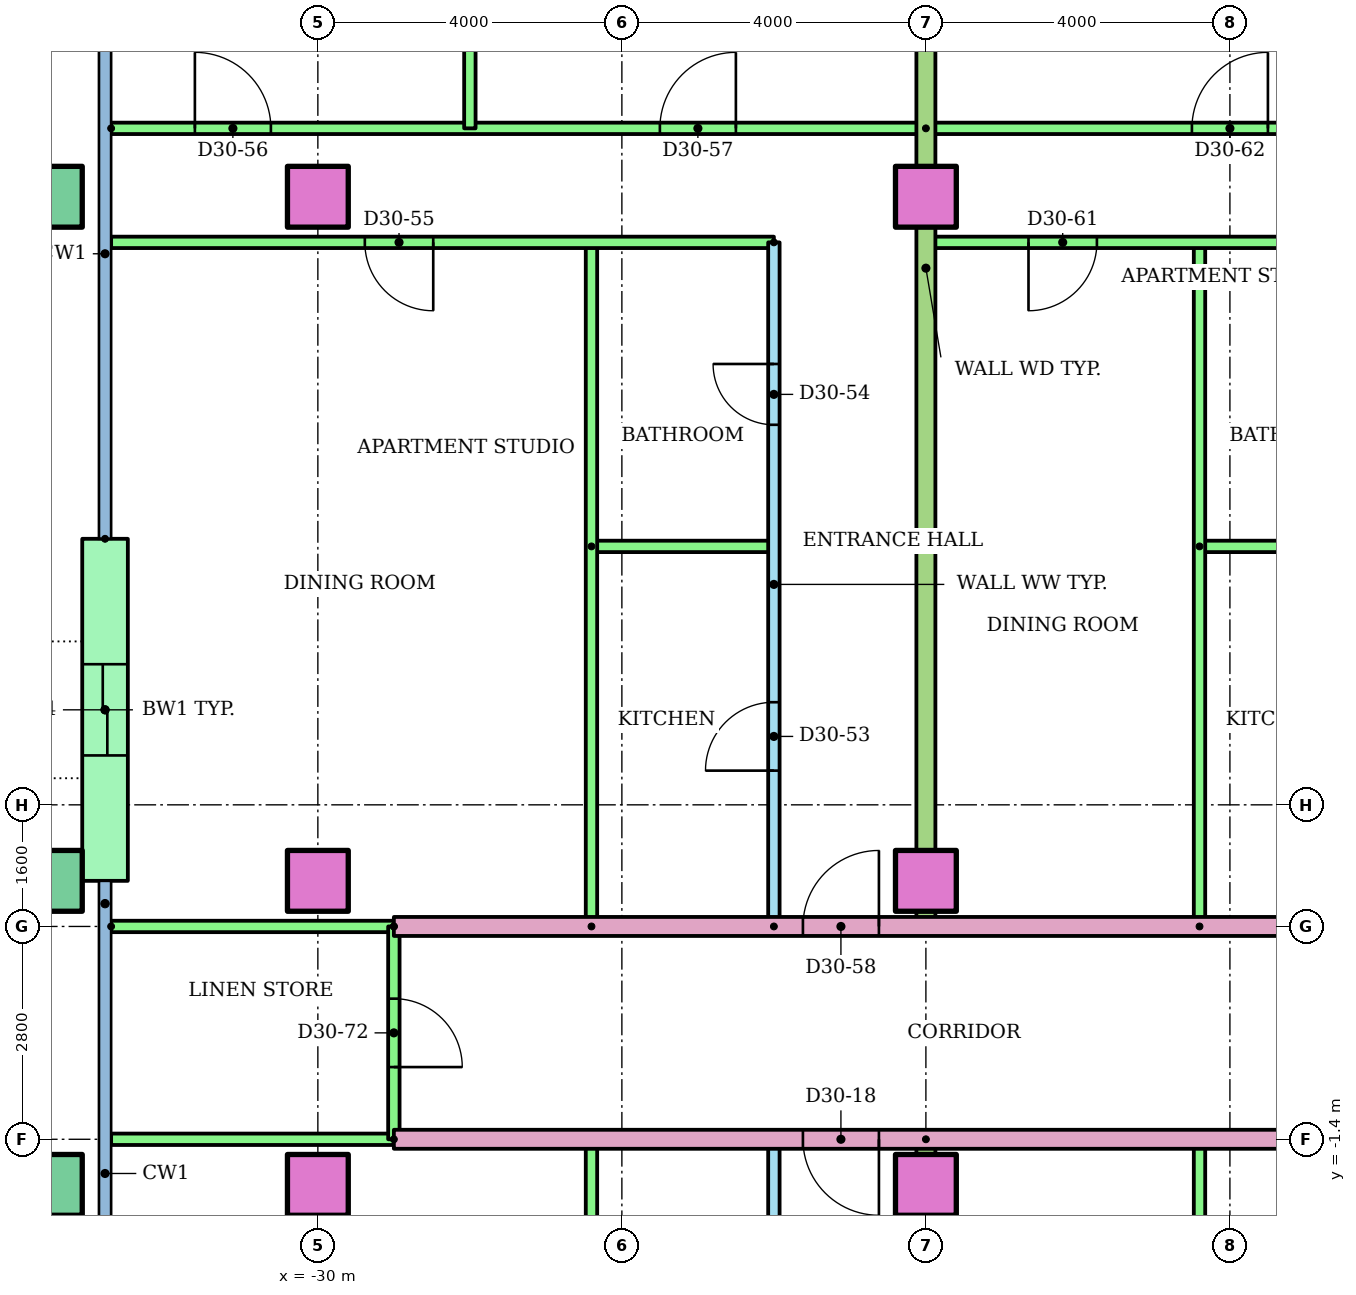
"""IFC4 building model, lengths in metres.
Left out: names, types, materials, properties, quantities, classifications, styles, units other than length and angle.
Written with IfcOpenShell. Run it as: python <this file> out.ifc"""

import sys

from ifc_helpers import new_model, si_unit, direction, frame, frame_2d, origin, origin_2d, place, context, subcontext, project, spatial, rectangle, hollow_rectangle, extrude, element, fill, save


model = new_model("IFC4")
c1 = context("Model", 3, precision=1e-05, world=origin(), true_north=direction((0.0, 1.0)))
c2 = subcontext(c1, "Body", "Model", "MODEL_VIEW")
j1 = project(units=[si_unit("LENGTHUNIT", "METRE"), si_unit("PLANEANGLEUNIT", "RADIAN")], contexts=[c1])
p1 = place(None, origin())
s1 = spatial("IfcSite", under=j1, at=p1, CompositionType="ELEMENT")
p2 = place(p1, origin())
s2 = spatial("IfcBuilding", under=s1, at=p2, CompositionType="ELEMENT")
p3 = place(p2, frame((0.0, 0.0, 119.8)))
s3 = spatial("IfcBuildingStorey", under=s2, at=p3, CompositionType="ELEMENT", Elevation=119.8)
p4 = place(p3, frame((-33.5, -2.0, 0.0)))
e1 = element("IfcColumn", 1, at=p4, inside=s3, PredefinedType="COLUMN", context=c2, shape_type="SweptSolid", body=[
    extrude(hollow_rectangle(XDim=0.8, YDim=0.8, WallThickness=0.04, at=origin_2d()), origin(), (0.0, 0.0, 1.0), 3.2),
])
for number, where in (
    (2, (-30.0, -2.0, 0.0)),
    (3, (-22.0, -2.0, 0.0)),
):
    element("IfcColumn", number, at=place(p3, frame(where)), inside=s3, PredefinedType="COLUMN", context=c2, shape_type="SweptSolid", body=[
        extrude(rectangle(XDim=0.8, YDim=0.8, at=origin_2d()), origin(), (0.0, 0.0, 1.0), 3.2),
    ])
p5 = place(p3, frame((-33.5, 2.0, 0.0)))
e4 = element("IfcColumn", 4, at=p5, inside=s3, PredefinedType="COLUMN", context=c2, shape_type="SweptSolid", body=[
    extrude(hollow_rectangle(XDim=0.8, YDim=0.8, WallThickness=0.04, at=origin_2d()), origin(), (0.0, 0.0, 1.0), 3.2),
])
for number, where in (
    (5, (-30.0, 2.0, 0.0)),
    (6, (-22.0, 2.0, 0.0)),
):
    element("IfcColumn", number, at=place(p3, frame(where)), inside=s3, PredefinedType="COLUMN", context=c2, shape_type="SweptSolid", body=[
        extrude(rectangle(XDim=0.8, YDim=0.8, at=origin_2d()), origin(), (0.0, 0.0, 1.0), 3.2),
    ])
p6 = place(p3, frame((-33.5, 11.0, 0.0)))
e7 = element("IfcColumn", 7, at=p6, inside=s3, PredefinedType="COLUMN", context=c2, shape_type="SweptSolid", body=[
    extrude(hollow_rectangle(XDim=0.8, YDim=0.8, WallThickness=0.04, at=origin_2d()), origin(), (0.0, 0.0, 1.0), 3.2),
])
for number, where in (
    (8, (-30.0, 11.0, 0.0)),
    (9, (-22.0, 11.0, 0.0)),
):
    element("IfcColumn", number, at=place(p3, frame(where)), inside=s3, PredefinedType="COLUMN", context=c2, shape_type="SweptSolid", body=[
        extrude(rectangle(XDim=0.8, YDim=0.8, at=origin_2d()), origin(), (0.0, 0.0, 1.0), 3.2),
    ])
p7 = place(p3, frame((-32.8, 6.5, 0.0), z_axis=(0.0, 0.0, 1.0), x_axis=(0.0, -1.0, 0.0)))
e10 = element("IfcWall", 10, at=p7, inside=s3, PredefinedType="STANDARD", context=c2, shape_type="SweptSolid", body=[
    extrude(rectangle(XDim=4.5, YDim=0.6, at=frame_2d((2.25, 0.0))), origin(), (0.0, 0.0, 1.0), 2.92),
])
p8 = place(p7, frame((1.65, 0.0, 0.0)))
e11 = element("IfcOpeningElement", 11, at=p8, cuts=e10, PredefinedType="OPENING", context=c2, shape_type="SweptSolid", body=[
    extrude(rectangle(XDim=1.2, YDim=2.1, at=frame_2d((0.6, 1.05))), frame((0.0, 0.31, 0.0), z_axis=(0.0, -1.0, 0.0), x_axis=(1.0, 0.0, 0.0)), (0.0, 0.0, 1.0), 0.62),
])
p9 = place(p3, frame((-24.0, -8.0, 0.0), z_axis=(0.0, 0.0, 1.0), x_axis=(0.0, 1.0, 0.0)))
e12 = element("IfcWall", 12, at=p9, inside=s3, PredefinedType="PARTITIONING", context=c2, shape_type="SweptSolid", body=[
    extrude(rectangle(XDim=6.6, YDim=0.15, at=frame_2d((3.3, 0.0))), origin(), (0.0, 0.0, 1.0), 2.4),
])
p10 = place(p9, frame((4.275, 0.0, 0.0)))
e13 = element("IfcOpeningElement", 13, at=p10, cuts=e12, PredefinedType="OPENING", context=c2, shape_type="SweptSolid", body=[
    extrude(rectangle(XDim=0.9, YDim=2.1, at=frame_2d((0.45, 1.05))), frame((0.0, 0.085, 0.0), z_axis=(0.0, -1.0, 0.0), x_axis=(1.0, 0.0, 0.0)), (0.0, 0.0, 1.0), 0.17),
])
p11 = place(p9, frame((1.025, 0.0, 0.0)))
e14 = element("IfcOpeningElement", 14, at=p11, cuts=e12, PredefinedType="OPENING", context=c2, shape_type="SweptSolid", body=[
    extrude(rectangle(XDim=0.8, YDim=2.1, at=frame_2d((0.4, 1.05))), frame((0.0, 0.085, 0.0), z_axis=(0.0, -1.0, 0.0), x_axis=(1.0, 0.0, 0.0)), (0.0, 0.0, 1.0), 0.17),
])
for number, where, z_axis, x_axis in (
    (15, (-26.4, -8.0, 0.0), (0.0, 0.0, 1.0), (0.0, 1.0, 0.0)),
    (16, (-18.4, -8.0, 0.0), (0.0, 0.0, 1.0), (0.0, 1.0, 0.0)),
):
    element("IfcWall", number, at=place(p3, frame(where, z_axis=z_axis, x_axis=x_axis)), inside=s3, PredefinedType="PARTITIONING", context=c2, shape_type="SweptSolid", body=[
        extrude(rectangle(XDim=6.6, YDim=0.15, at=frame_2d((3.3, 0.0))), origin(), (0.0, 0.0, 1.0), 2.4),
    ])
p12 = place(p3, frame((-22.0, -1.4, 0.0), z_axis=(0.0, 0.0, 1.0), x_axis=(0.0, -1.0, 0.0)))
e17 = element("IfcWall", 17, at=p12, inside=s3, PredefinedType="PARTITIONING", context=c2, shape_type="SweptSolid", body=[
    extrude(rectangle(XDim=14.91, YDim=0.25, at=frame_2d((7.455, 0.0))), origin(), (0.0, 0.0, 1.0), 2.4),
])
p13 = place(p3, frame((-14.0, -1.4, 0.0), z_axis=(0.0, 0.0, 1.0), x_axis=(-1.0, 0.0, 0.0)))
e18 = element("IfcWall", 18, at=p13, inside=s3, PredefinedType="PARTITIONING", context=c2, shape_type="SweptSolid", body=[
    extrude(rectangle(XDim=15.0, YDim=0.25, at=frame_2d((7.5, 0.0))), origin(), (0.0, 0.0, 1.0), 2.4),
])
p14 = place(p13, frame((8.618, 0.0, 0.0)))
e19 = element("IfcOpeningElement", 19, at=p14, cuts=e18, PredefinedType="OPENING", context=c2, shape_type="SweptSolid", body=[
    extrude(rectangle(XDim=1.0, YDim=2.1, at=frame_2d((0.5, 1.05))), frame((0.0, 0.135, 0.0), z_axis=(0.0, -1.0, 0.0), x_axis=(1.0, 0.0, 0.0)), (0.0, 0.0, 1.0), 0.27),
])
p15 = place(p13, frame((0.618, 0.0, 0.0)))
e20 = element("IfcOpeningElement", 20, at=p15, cuts=e18, PredefinedType="OPENING", context=c2, shape_type="SweptSolid", body=[
    extrude(rectangle(XDim=1.0, YDim=2.1, at=frame_2d((0.5, 1.05))), frame((0.0, 0.135, 0.0), z_axis=(0.0, -1.0, 0.0), x_axis=(1.0, 0.0, 0.0)), (0.0, 0.0, 1.0), 0.27),
])
p16 = place(p3, frame((-29.0, -1.4, 0.0), z_axis=(0.0, 0.0, 1.0), x_axis=(-1.0, 0.0, 0.0)))
e21 = element("IfcWall", 21, at=p16, inside=s3, PredefinedType="PARTITIONING", context=c2, shape_type="SweptSolid", body=[
    extrude(rectangle(XDim=3.72, YDim=0.15, at=frame_2d((1.86, 0.0))), origin(), (0.0, 0.0, 1.0), 2.4),
])
p17 = place(p3, frame((-24.0, 1.4, 0.0), z_axis=(0.0, 0.0, 1.0), x_axis=(0.0, 1.0, 0.0)))
e22 = element("IfcWall", 22, at=p17, inside=s3, PredefinedType="PARTITIONING", context=c2, shape_type="SweptSolid", body=[
    extrude(rectangle(XDim=9.0, YDim=0.15, at=frame_2d((4.5, 0.0))), origin(), (0.0, 0.0, 1.0), 2.4),
])
p18 = place(p17, frame((2.05, 0.0, 0.0)))
e23 = element("IfcOpeningElement", 23, at=p18, cuts=e22, PredefinedType="OPENING", context=c2, shape_type="SweptSolid", body=[
    extrude(rectangle(XDim=0.9, YDim=2.1, at=frame_2d((0.45, 1.05))), frame((0.0, 0.085, 0.0), z_axis=(0.0, -1.0, 0.0), x_axis=(1.0, 0.0, 0.0)), (0.0, 0.0, 1.0), 0.17),
])
p19 = place(p17, frame((6.6, 0.0, 0.0)))
e24 = element("IfcOpeningElement", 24, at=p19, cuts=e22, PredefinedType="OPENING", context=c2, shape_type="SweptSolid", body=[
    extrude(rectangle(XDim=0.8, YDim=2.1, at=frame_2d((0.4, 1.05))), frame((0.0, 0.085, 0.0), z_axis=(0.0, -1.0, 0.0), x_axis=(1.0, 0.0, 0.0)), (0.0, 0.0, 1.0), 0.17),
])
p20 = place(p3, frame((-26.4, 6.4, 0.0)))
e25 = element("IfcWall", 25, at=p20, inside=s3, PredefinedType="PARTITIONING", context=c2, shape_type="SweptSolid", body=[
    extrude(rectangle(XDim=2.4, YDim=0.15, at=frame_2d((1.2, 0.0))), origin(), (0.0, 0.0, 1.0), 2.4),
])
p21 = place(p3, frame((-26.4, 1.4, 0.0), z_axis=(0.0, 0.0, 1.0), x_axis=(0.0, 1.0, 0.0)))
e26 = element("IfcWall", 26, at=p21, inside=s3, PredefinedType="PARTITIONING", context=c2, shape_type="SweptSolid", body=[
    extrude(rectangle(XDim=9.0, YDim=0.15, at=frame_2d((4.5, 0.0))), origin(), (0.0, 0.0, 1.0), 2.4),
])
p22 = place(p3, frame((-24.0, 10.4, 0.0), z_axis=(0.0, 0.0, 1.0), x_axis=(-1.0, 0.0, 0.0)))
e27 = element("IfcWall", 27, at=p22, inside=s3, PredefinedType="PARTITIONING", context=c2, shape_type="SweptSolid", body=[
    extrude(rectangle(XDim=8.72, YDim=0.15, at=frame_2d((4.36, 0.0))), origin(), (0.0, 0.0, 1.0), 2.4),
])
p23 = place(p22, frame((4.482, 0.0, 0.0)))
e28 = element("IfcOpeningElement", 28, at=p23, cuts=e27, PredefinedType="OPENING", context=c2, shape_type="SweptSolid", body=[
    extrude(rectangle(XDim=0.9, YDim=2.1, at=frame_2d((0.45, 1.05))), frame((0.0, 0.085, 0.0), z_axis=(0.0, -1.0, 0.0), x_axis=(1.0, 0.0, 0.0)), (0.0, 0.0, 1.0), 0.17),
])
p24 = place(p3, frame((-32.72, 11.9, 0.0)))
e29 = element("IfcWall", 29, at=p24, inside=s3, PredefinedType="PARTITIONING", context=c2, shape_type="SweptSolid", body=[
    extrude(rectangle(XDim=10.72, YDim=0.15, at=frame_2d((5.36, 0.0))), origin(), (0.0, 0.0, 1.0), 2.4),
])
p25 = place(p24, frame((1.102, 0.0, 0.0)))
e30 = element("IfcOpeningElement", 30, at=p25, cuts=e29, PredefinedType="OPENING", context=c2, shape_type="SweptSolid", body=[
    extrude(rectangle(XDim=1.0, YDim=2.1, at=frame_2d((0.5, 1.05))), frame((0.0, 0.085, 0.0), z_axis=(0.0, -1.0, 0.0), x_axis=(1.0, 0.0, 0.0)), (0.0, 0.0, 1.0), 0.17),
])
p26 = place(p24, frame((7.22, 0.0, 0.0)))
e31 = element("IfcOpeningElement", 31, at=p26, cuts=e29, PredefinedType="OPENING", context=c2, shape_type="SweptSolid", body=[
    extrude(rectangle(XDim=1.0, YDim=2.1, at=frame_2d((0.5, 1.05))), frame((0.0, 0.085, 0.0), z_axis=(0.0, -1.0, 0.0), x_axis=(1.0, 0.0, 0.0)), (0.0, 0.0, 1.0), 0.17),
])
p27 = place(p3, frame((-28.0, 16.92, 0.0), z_axis=(0.0, 0.0, 1.0), x_axis=(0.0, -1.0, 0.0)))
e32 = element("IfcWall", 32, at=p27, inside=s3, PredefinedType="PARTITIONING", context=c2, shape_type="SweptSolid", body=[
    extrude(rectangle(XDim=5.02, YDim=0.15, at=frame_2d((2.51, 0.0))), origin(), (0.0, 0.0, 1.0), 2.4),
])
p28 = place(p3, frame((-18.4, 6.4, 0.0)))
e33 = element("IfcWall", 33, at=p28, inside=s3, PredefinedType="PARTITIONING", context=c2, shape_type="SweptSolid", body=[
    extrude(rectangle(XDim=2.4, YDim=0.15, at=frame_2d((1.2, 0.0))), origin(), (0.0, 0.0, 1.0), 2.4),
])
p29 = place(p3, frame((-18.4, 1.4, 0.0), z_axis=(0.0, 0.0, 1.0), x_axis=(0.0, 1.0, 0.0)))
e34 = element("IfcWall", 34, at=p29, inside=s3, PredefinedType="PARTITIONING", context=c2, shape_type="SweptSolid", body=[
    extrude(rectangle(XDim=9.0, YDim=0.15, at=frame_2d((4.5, 0.0))), origin(), (0.0, 0.0, 1.0), 2.4),
])
p30 = place(p3, frame((-16.0, 10.4, 0.0), z_axis=(0.0, 0.0, 1.0), x_axis=(-1.0, 0.0, 0.0)))
e35 = element("IfcWall", 35, at=p30, inside=s3, PredefinedType="PARTITIONING", context=c2, shape_type="SweptSolid", body=[
    extrude(rectangle(XDim=6.0, YDim=0.15, at=frame_2d((3.0, 0.0))), origin(), (0.0, 0.0, 1.0), 2.4),
])
p31 = place(p30, frame((3.75, 0.0, 0.0)))
e36 = element("IfcOpeningElement", 36, at=p31, cuts=e35, PredefinedType="OPENING", context=c2, shape_type="SweptSolid", body=[
    extrude(rectangle(XDim=0.9, YDim=2.1, at=frame_2d((0.45, 1.05))), frame((0.0, 0.085, 0.0), z_axis=(0.0, -1.0, 0.0), x_axis=(1.0, 0.0, 0.0)), (0.0, 0.0, 1.0), 0.17),
])
p32 = place(p3, frame((-22.0, 11.9, 0.0)))
e37 = element("IfcWall", 37, at=p32, inside=s3, PredefinedType="PARTITIONING", context=c2, shape_type="SweptSolid", body=[
    extrude(rectangle(XDim=8.0, YDim=0.15, at=frame_2d((4.0, 0.0))), origin(), (0.0, 0.0, 1.0), 2.4),
])
p33 = place(p32, frame((3.5, 0.0, 0.0)))
e38 = element("IfcOpeningElement", 38, at=p33, cuts=e37, PredefinedType="OPENING", context=c2, shape_type="SweptSolid", body=[
    extrude(rectangle(XDim=1.0, YDim=2.1, at=frame_2d((0.5, 1.05))), frame((0.0, 0.085, 0.0), z_axis=(0.0, -1.0, 0.0), x_axis=(1.0, 0.0, 0.0)), (0.0, 0.0, 1.0), 0.17),
])
p34 = place(p3, frame((-22.0, 18.721, 0.0), z_axis=(0.0, 0.0, 1.0), x_axis=(0.0, -1.0, 0.0)))
e39 = element("IfcWall", 39, at=p34, inside=s3, PredefinedType="PARTITIONING", context=c2, shape_type="SweptSolid", body=[
    extrude(rectangle(XDim=17.321, YDim=0.25, at=frame_2d((8.661, 0.0))), origin(), (0.0, 0.0, 1.0), 2.4),
])
p35 = place(p3, frame((-29.0, 1.4, 0.0)))
e40 = element("IfcWall", 40, at=p35, inside=s3, PredefinedType="PARTITIONING", context=c2, shape_type="SweptSolid", body=[
    extrude(rectangle(XDim=15.0, YDim=0.25, at=frame_2d((7.5, 0.0))), origin(), (0.0, 0.0, 1.0), 2.4),
])
p36 = place(p35, frame((5.382, 0.0, 0.0)))
e41 = element("IfcOpeningElement", 41, at=p36, cuts=e40, PredefinedType="OPENING", context=c2, shape_type="SweptSolid", body=[
    extrude(rectangle(XDim=1.0, YDim=2.1, at=frame_2d((0.5, 1.05))), frame((0.0, 0.135, 0.0), z_axis=(0.0, -1.0, 0.0), x_axis=(1.0, 0.0, 0.0)), (0.0, 0.0, 1.0), 0.27),
])
p37 = place(p35, frame((13.5, 0.0, 0.0)))
e42 = element("IfcOpeningElement", 42, at=p37, cuts=e40, PredefinedType="OPENING", context=c2, shape_type="SweptSolid", body=[
    extrude(rectangle(XDim=1.0, YDim=2.1, at=frame_2d((0.5, 1.05))), frame((0.0, 0.135, 0.0), z_axis=(0.0, -1.0, 0.0), x_axis=(1.0, 0.0, 0.0)), (0.0, 0.0, 1.0), 0.27),
])
p38 = place(p3, frame((-32.72, 1.4, 0.0)))
e43 = element("IfcWall", 43, at=p38, inside=s3, PredefinedType="PARTITIONING", context=c2, shape_type="SweptSolid", body=[
    extrude(rectangle(XDim=3.72, YDim=0.15, at=frame_2d((1.86, 0.0))), origin(), (0.0, 0.0, 1.0), 2.4),
])
p39 = place(p3, frame((-29.0, 1.4, 0.0), z_axis=(0.0, 0.0, 1.0), x_axis=(0.0, -1.0, 0.0)))
e44 = element("IfcWall", 44, at=p39, inside=s3, PredefinedType="PARTITIONING", context=c2, shape_type="SweptSolid", body=[
    extrude(rectangle(XDim=2.8, YDim=0.15, at=frame_2d((1.4, 0.0))), origin(), (0.0, 0.0, 1.0), 2.4),
])
p40 = place(p39, frame((0.95, 0.0, 0.0)))
e45 = element("IfcOpeningElement", 45, at=p40, cuts=e44, PredefinedType="OPENING", context=c2, shape_type="SweptSolid", body=[
    extrude(rectangle(XDim=0.9, YDim=2.1, at=frame_2d((0.45, 1.05))), frame((0.0, 0.085, 0.0), z_axis=(0.0, -1.0, 0.0), x_axis=(1.0, 0.0, 0.0)), (0.0, 0.0, 1.0), 0.17),
])
p41 = place(p14, origin())
e46 = element("IfcDoor", 46, at=p41, inside=s3, OperationType="SINGLE_SWING_LEFT", PredefinedType="DOOR", context=c2, shape_type="SweptSolid", body=[
    extrude(rectangle(XDim=1.0, YDim=2.1, at=frame_2d((0.5, 1.05))), frame((0.0, 0.025, 0.0), z_axis=(0.0, -1.0, 0.0), x_axis=(1.0, 0.0, 0.0)), (0.0, 0.0, 1.0), 0.05),
])
fill(e19, e46)
p42 = place(p18, origin())
e47 = element("IfcDoor", 47, at=p42, inside=s3, OperationType="SINGLE_SWING_LEFT", PredefinedType="DOOR", context=c2, shape_type="SweptSolid", body=[
    extrude(rectangle(XDim=0.9, YDim=2.1, at=frame_2d((0.45, 1.05))), frame((0.0, 0.025, 0.0), z_axis=(0.0, -1.0, 0.0), x_axis=(1.0, 0.0, 0.0)), (0.0, 0.0, 1.0), 0.05),
])
fill(e23, e47)
p43 = place(p19, origin())
e48 = element("IfcDoor", 48, at=p43, inside=s3, OperationType="SINGLE_SWING_RIGHT", PredefinedType="DOOR", context=c2, shape_type="SweptSolid", body=[
    extrude(rectangle(XDim=0.8, YDim=2.1, at=frame_2d((0.4, 1.05))), frame((0.0, 0.025, 0.0), z_axis=(0.0, -1.0, 0.0), x_axis=(1.0, 0.0, 0.0)), (0.0, 0.0, 1.0), 0.05),
])
fill(e24, e48)
p44 = place(p23, origin())
e49 = element("IfcDoor", 49, at=p44, inside=s3, OperationType="SINGLE_SWING_LEFT", PredefinedType="DOOR", context=c2, shape_type="SweptSolid", body=[
    extrude(rectangle(XDim=0.9, YDim=2.1, at=frame_2d((0.45, 1.05))), frame((0.0, 0.025, 0.0), z_axis=(0.0, -1.0, 0.0), x_axis=(1.0, 0.0, 0.0)), (0.0, 0.0, 1.0), 0.05),
])
fill(e28, e49)
p45 = place(p25, origin())
e50 = element("IfcDoor", 50, at=p45, inside=s3, OperationType="SINGLE_SWING_LEFT", PredefinedType="DOOR", context=c2, shape_type="SweptSolid", body=[
    extrude(rectangle(XDim=1.0, YDim=2.1, at=frame_2d((0.5, 1.05))), frame((0.0, 0.025, 0.0), z_axis=(0.0, -1.0, 0.0), x_axis=(1.0, 0.0, 0.0)), (0.0, 0.0, 1.0), 0.05),
])
fill(e30, e50)
p46 = place(p26, origin())
e51 = element("IfcDoor", 51, at=p46, inside=s3, OperationType="SINGLE_SWING_RIGHT", PredefinedType="DOOR", context=c2, shape_type="SweptSolid", body=[
    extrude(rectangle(XDim=1.0, YDim=2.1, at=frame_2d((0.5, 1.05))), frame((0.0, 0.025, 0.0), z_axis=(0.0, -1.0, 0.0), x_axis=(1.0, 0.0, 0.0)), (0.0, 0.0, 1.0), 0.05),
])
fill(e31, e51)
p47 = place(p36, origin())
e52 = element("IfcDoor", 52, at=p47, inside=s3, OperationType="SINGLE_SWING_RIGHT", PredefinedType="DOOR", context=c2, shape_type="SweptSolid", body=[
    extrude(rectangle(XDim=1.0, YDim=2.1, at=frame_2d((0.5, 1.05))), frame((0.0, 0.025, 0.0), z_axis=(0.0, -1.0, 0.0), x_axis=(1.0, 0.0, 0.0)), (0.0, 0.0, 1.0), 0.05),
])
fill(e41, e52)
p48 = place(p31, origin())
e53 = element("IfcDoor", 53, at=p48, inside=s3, OperationType="SINGLE_SWING_RIGHT", PredefinedType="DOOR", context=c2, shape_type="SweptSolid", body=[
    extrude(rectangle(XDim=0.9, YDim=2.1, at=frame_2d((0.45, 1.05))), frame((0.0, 0.025, 0.0), z_axis=(0.0, -1.0, 0.0), x_axis=(1.0, 0.0, 0.0)), (0.0, 0.0, 1.0), 0.05),
])
fill(e36, e53)
p49 = place(p33, origin())
e54 = element("IfcDoor", 54, at=p49, inside=s3, OperationType="SINGLE_SWING_RIGHT", PredefinedType="DOOR", context=c2, shape_type="SweptSolid", body=[
    extrude(rectangle(XDim=1.0, YDim=2.1, at=frame_2d((0.5, 1.05))), frame((0.0, 0.025, 0.0), z_axis=(0.0, -1.0, 0.0), x_axis=(1.0, 0.0, 0.0)), (0.0, 0.0, 1.0), 0.05),
])
fill(e38, e54)
p50 = place(p40, origin())
e55 = element("IfcDoor", 55, at=p50, inside=s3, OperationType="SINGLE_SWING_RIGHT", PredefinedType="DOOR", context=c2, shape_type="SweptSolid", body=[
    extrude(rectangle(XDim=0.9, YDim=2.1, at=frame_2d((0.45, 1.05))), frame((0.0, 0.025, 0.0), z_axis=(0.0, -1.0, 0.0), x_axis=(1.0, 0.0, 0.0)), (0.0, 0.0, 1.0), 0.05),
])
fill(e45, e55)
p51 = place(p8, origin())
e56 = element("IfcDoor", 56, at=p51, inside=s3, OperationType="SLIDING_TO_LEFT", PredefinedType="DOOR", context=c2, shape_type="SweptSolid", body=[
    extrude(rectangle(XDim=1.2, YDim=2.1, at=frame_2d((0.6, 1.05))), frame((0.0, 0.025, 0.0), z_axis=(0.0, -1.0, 0.0), x_axis=(1.0, 0.0, 0.0)), (0.0, 0.0, 1.0), 0.05),
])
fill(e11, e56)
save(model, sys.argv[1])
